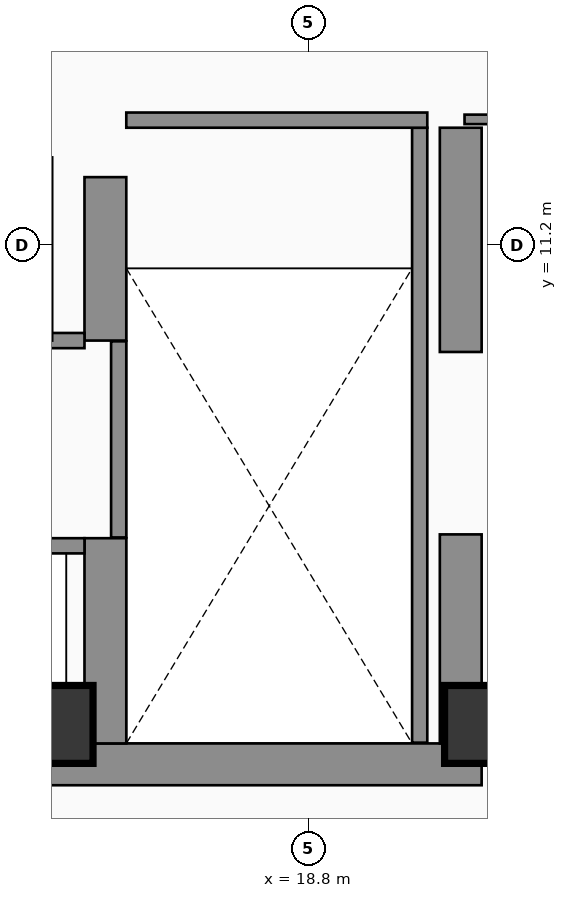
"""IFC4 building model, lengths in metres.
Left out: names, types, materials, properties, quantities, classifications, styles, units other than length and angle.
Written with IfcOpenShell. Run it as: python <this file> out.ifc"""

import sys

from ifc_helpers import new_model, si_unit, direction, frame, frame_2d, origin, origin_2d, place, context, subcontext, project, spatial, rectangle, extrude, element, fill, save


model = new_model("IFC4")
c1 = context("Model", 3, precision=1e-05, world=origin(), true_north=direction((0.0, 1.0)))
c2 = subcontext(c1, "Body", "Model", "MODEL_VIEW")
j1 = project(units=[si_unit("LENGTHUNIT", "METRE"), si_unit("PLANEANGLEUNIT", "RADIAN")], contexts=[c1])
p1 = place(None, origin())
s1 = spatial("IfcSite", under=j1, at=p1, CompositionType="ELEMENT")
p2 = place(p1, origin())
s2 = spatial("IfcBuilding", under=s1, at=p2, CompositionType="ELEMENT")
p3 = place(p2, frame((0.0, 0.0, 223.5)))
s3 = spatial("IfcBuildingStorey", under=s2, at=p3, CompositionType="ELEMENT", Elevation=223.5)
p4 = place(p3, frame((7.175, 4.375, 0.0), z_axis=(0.0, 0.0, 1.0), x_axis=(1.0, 0.0, 0.0)))
e1 = element("IfcWall", 1, at=p4, inside=s3, PredefinedType="SHEAR", context=c2, shape_type="SweptSolid", body=[
    extrude(rectangle(XDim=13.9, YDim=0.55, at=frame_2d((6.95, 0.0))), origin(), (0.0, 0.0, 1.0), 3.56),
])
p5 = place(p3, frame((20.8, 4.65, 0.0), z_axis=(0.0, 0.0, 1.0), x_axis=(0.0, 1.0, 0.0)))
e2 = element("IfcWall", 2, at=p5, inside=s3, PredefinedType="SHEAR", context=c2, shape_type="SweptSolid", body=[
    extrude(rectangle(XDim=2.75, YDim=0.55, at=frame_2d((1.375, 0.0))), origin(), (0.0, 0.0, 1.0), 3.56),
])
p6 = place(p3, frame((20.8, 9.8, 0.0), z_axis=(0.0, 0.0, 1.0), x_axis=(0.0, 1.0, 0.0)))
e3 = element("IfcWall", 3, at=p6, inside=s3, PredefinedType="SHEAR", context=c2, shape_type="SweptSolid", body=[
    extrude(rectangle(XDim=2.95, YDim=0.55, at=frame_2d((1.475, 0.0))), origin(), (0.0, 0.0, 1.0), 3.56),
])
p7 = place(p3, frame((16.125, 4.65, 0.0), z_axis=(0.0, 0.0, 1.0), x_axis=(0.0, 1.0, 0.0)))
e4 = element("IfcWall", 4, at=p7, inside=s3, PredefinedType="SHEAR", context=c2, shape_type="SweptSolid", body=[
    extrude(rectangle(XDim=2.7, YDim=0.55, at=frame_2d((1.35, 0.0))), origin(), (0.0, 0.0, 1.0), 3.56),
])
p8 = place(p3, frame((16.125, 9.95, 0.0), z_axis=(0.0, 0.0, 1.0), x_axis=(0.0, 1.0, 0.0)))
e5 = element("IfcWall", 5, at=p8, inside=s3, PredefinedType="SHEAR", context=c2, shape_type="SweptSolid", body=[
    extrude(rectangle(XDim=2.15, YDim=0.55, at=frame_2d((1.075, 0.0))), origin(), (0.0, 0.0, 1.0), 3.56),
])
for number, where, z_axis, x_axis in (
    (6, (15.45, 4.9, 0.0), (0.0, 0.0, 1.0), (1.0, 0.0, 0.0)),
    (7, (21.1, 4.9, 0.0), (0.0, 0.0, 1.0), (1.0, 0.0, 0.0)),
):
    element("IfcColumn", number, at=place(p3, frame(where, z_axis=z_axis, x_axis=x_axis)), inside=s3, PredefinedType="COLUMN", context=c2, shape_type="SweptSolid", body=[
        extrude(rectangle(XDim=1.0, YDim=1.0, at=origin_2d()), origin(), (0.0, 0.0, 1.0), 3.56),
    ])
p9 = place(p3, frame((16.3, 7.36, 0.0), z_axis=(0.0, 0.0, 1.0), x_axis=(0.0, 1.0, 0.0)))
e8 = element("IfcWall", 8, at=p9, inside=s3, PredefinedType="SHEAR", context=c2, shape_type="SweptSolid", body=[
    extrude(rectangle(XDim=2.58, YDim=0.2, at=frame_2d((1.29, 0.0))), origin(), (0.0, 0.0, 1.0), 3.56),
])
p10 = place(p3, frame((20.26, 4.66, 0.0), z_axis=(0.0, 0.0, 1.0), x_axis=(0.0, 1.0, 0.0)))
e9 = element("IfcWall", 9, at=p10, inside=s3, PredefinedType="SHEAR", context=c2, shape_type="SweptSolid", body=[
    extrude(rectangle(XDim=8.09, YDim=0.2, at=frame_2d((4.045, 0.0))), origin(), (0.0, 0.0, 1.0), 3.56),
])
p11 = place(p3, frame((16.4, 12.85, 0.0), z_axis=(0.0, 0.0, 1.0), x_axis=(1.0, 0.0, 0.0)))
e10 = element("IfcWall", 10, at=p11, inside=s3, PredefinedType="PARTITIONING", context=c2, shape_type="SweptSolid", body=[
    extrude(rectangle(XDim=3.96, YDim=0.2, at=frame_2d((1.98, 0.0))), origin(), (0.0, 0.0, 1.0), 3.56),
])
p12 = place(p11, frame((1.304, 0.0, 0.0)))
e11 = element("IfcOpeningElement", 11, at=p12, cuts=e10, PredefinedType="OPENING", context=c2, shape_type="SweptSolid", body=[
    extrude(rectangle(XDim=1.1, YDim=2.2, at=frame_2d((0.55, 1.1))), frame((0.0, 0.11, 0.0), z_axis=(0.0, -1.0, 0.0), x_axis=(1.0, 0.0, 0.0)), (0.0, 0.0, 1.0), 0.22),
])
p13 = place(p3, frame((7.5, 7.25, 0.0), z_axis=(0.0, 0.0, 1.0), x_axis=(1.0, 0.0, 0.0)))
e12 = element("IfcWall", 12, at=p13, inside=s3, PredefinedType="PARTITIONING", context=c2, shape_type="SweptSolid", body=[
    extrude(rectangle(XDim=8.35, YDim=0.2, at=frame_2d((4.175, 0.0))), origin(), (0.0, 0.0, 1.0), 3.56),
])
p14 = place(p13, frame((0.53, 0.0, 0.0)))
e13 = element("IfcOpeningElement", 13, at=p14, cuts=e12, PredefinedType="OPENING", context=c2, shape_type="SweptSolid", body=[
    extrude(rectangle(XDim=1.1, YDim=2.2, at=frame_2d((0.55, 1.1))), frame((0.0, 0.11, 0.0), z_axis=(0.0, -1.0, 0.0), x_axis=(1.0, 0.0, 0.0)), (0.0, 0.0, 1.0), 0.22),
])
p15 = place(p13, frame((2.37, 0.0, 0.0)))
e14 = element("IfcOpeningElement", 14, at=p15, cuts=e12, PredefinedType="OPENING", context=c2, shape_type="SweptSolid", body=[
    extrude(rectangle(XDim=1.1, YDim=2.2, at=frame_2d((0.55, 1.1))), frame((0.0, 0.11, 0.0), z_axis=(0.0, -1.0, 0.0), x_axis=(1.0, 0.0, 0.0)), (0.0, 0.0, 1.0), 0.22),
])
p16 = place(p13, frame((4.33, 0.0, 0.0)))
e15 = element("IfcOpeningElement", 15, at=p16, cuts=e12, PredefinedType="OPENING", context=c2, shape_type="SweptSolid", body=[
    extrude(rectangle(XDim=1.1, YDim=2.2, at=frame_2d((0.55, 1.1))), frame((0.0, 0.11, 0.0), z_axis=(0.0, -1.0, 0.0), x_axis=(1.0, 0.0, 0.0)), (0.0, 0.0, 1.0), 0.22),
])
p17 = place(p13, frame((6.5, 0.0, 0.0)))
e16 = element("IfcOpeningElement", 16, at=p17, cuts=e12, PredefinedType="OPENING", context=c2, shape_type="SweptSolid", body=[
    extrude(rectangle(XDim=1.1, YDim=2.2, at=frame_2d((0.55, 1.1))), frame((0.0, 0.11, 0.0), z_axis=(0.0, -1.0, 0.0), x_axis=(1.0, 0.0, 0.0)), (0.0, 0.0, 1.0), 0.22),
])
p18 = place(p3, frame((7.5, 9.95, 0.0), z_axis=(0.0, 0.0, 1.0), x_axis=(1.0, 0.0, 0.0)))
e17 = element("IfcWall", 17, at=p18, inside=s3, PredefinedType="PARTITIONING", context=c2, shape_type="SweptSolid", body=[
    extrude(rectangle(XDim=8.35, YDim=0.2, at=frame_2d((4.175, 0.0))), origin(), (0.0, 0.0, 1.0), 3.56),
])
p19 = place(p3, frame((15.35, 9.95, 0.0), z_axis=(0.0, 0.0, 1.0), x_axis=(0.0, 1.0, 0.0)))
e18 = element("IfcWall", 18, at=p19, inside=s3, PredefinedType="PARTITIONING", context=c2, shape_type="SweptSolid", body=[
    extrude(rectangle(XDim=2.41, YDim=0.15, at=frame_2d((1.205, 0.0))), origin(), (0.0, 0.0, 1.0), 3.56),
])
p20 = place(p3, frame((20.85, 12.86, 0.0), z_axis=(0.0, 0.0, 1.0), x_axis=(1.0, 0.0, 0.0)))
e19 = element("IfcWall", 19, at=p20, inside=s3, PredefinedType="PARTITIONING", context=c2, shape_type="SweptSolid", body=[
    extrude(rectangle(XDim=2.85, YDim=0.125, at=frame_2d((1.425, 0.0))), origin(), (0.0, 0.0, 1.0), 3.56),
])
p21 = place(p20, frame((0.971, 0.0, 0.0)))
e20 = element("IfcOpeningElement", 20, at=p21, cuts=e19, PredefinedType="OPENING", context=c2, shape_type="SweptSolid", body=[
    extrude(rectangle(XDim=0.95, YDim=2.15, at=frame_2d((0.475, 1.075))), frame((0.0, 0.073, 0.0), z_axis=(0.0, -1.0, 0.0), x_axis=(1.0, 0.0, 0.0)), (0.0, 0.0, 1.0), 0.145),
])
p22 = place(p12, frame((1.1, 0.0, 0.0), z_axis=(0.0, 0.0, 1.0), x_axis=(-1.0, 0.0, 0.0)))
e21 = element("IfcDoor", 21, at=p22, inside=s3, OperationType="SINGLE_SWING_RIGHT", PredefinedType="DOOR", context=c2, shape_type="SweptSolid", body=[
    extrude(rectangle(XDim=1.1, YDim=2.2, at=frame_2d((0.55, 1.1))), frame((0.0, 0.025, 0.0), z_axis=(0.0, -1.0, 0.0), x_axis=(1.0, 0.0, 0.0)), (0.0, 0.0, 1.0), 0.05),
])
fill(e11, e21)
save(model, sys.argv[1])
